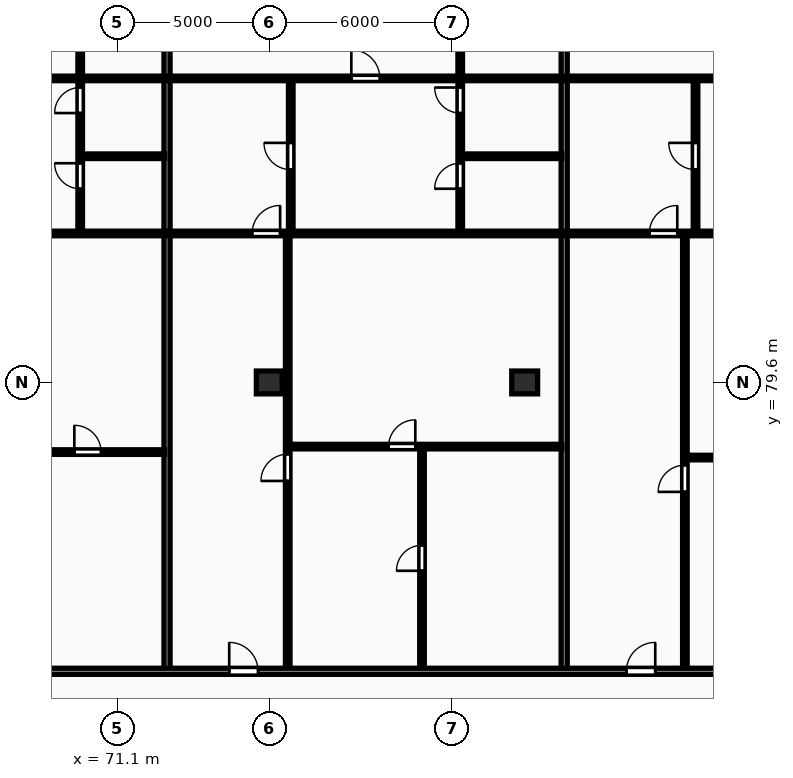
"""IFC4 building model, lengths in metres.
Left out: names, types, materials, properties, quantities, classifications, styles, units other than length and angle.
Written with IfcOpenShell. Run it as: python <this file> out.ifc"""

import sys

from ifc_helpers import new_model, si_unit, direction, frame, frame_2d, origin, origin_2d, place, context, subcontext, project, spatial, rectangle, extrude, element, fill, save


model = new_model("IFC4")
c1 = context("Model", 3, precision=1e-05, world=origin(), true_north=direction((0.0, 1.0)))
c2 = subcontext(c1, "Body", "Model", "MODEL_VIEW")
j1 = project(units=[si_unit("LENGTHUNIT", "METRE"), si_unit("PLANEANGLEUNIT", "RADIAN")], contexts=[c1])
p1 = place(None, origin())
s1 = spatial("IfcSite", under=j1, at=p1, CompositionType="ELEMENT")
p2 = place(p1, origin())
s2 = spatial("IfcBuilding", under=s1, at=p2, CompositionType="ELEMENT")
p3 = place(p2, frame((0.0, 0.0, 207.6)))
s3 = spatial("IfcBuildingStorey", under=s2, at=p3, CompositionType="ELEMENT", Elevation=207.6)
for number, where, z_axis, x_axis in (
    (1, (76.1, 79.6, 0.0), (0.0, 0.0, 1.0), (1.0, 0.0, 0.0)),
    (2, (84.5, 79.6, 0.0), (0.0, 0.0, 1.0), (1.0, 0.0, 0.0)),
):
    element("IfcColumn", number, at=place(p3, frame(where, z_axis=z_axis, x_axis=x_axis)), inside=s3, PredefinedType="COLUMN", context=c2, shape_type="SweptSolid", body=[
        extrude(rectangle(XDim=0.85, YDim=0.75, at=origin_2d()), origin(), (0.0, 0.0, 1.0), 3.25),
    ])
p4 = place(p3, frame((72.736, 70.18, 0.0), z_axis=(0.0, 0.0, 1.0), x_axis=(0.0, 1.0, 0.0)))
e3 = element("IfcWall", 3, at=p4, inside=s3, PredefinedType="PARTITIONING", context=c2, shape_type="SweptSolid", body=[
    extrude(rectangle(XDim=24.32, YDim=0.2, at=frame_2d((12.16, 0.0))), origin(), (0.0, 0.0, 1.0), 2.97),
])
p5 = place(p3, frame((63.83, 77.31, 0.0), z_axis=(0.0, 0.0, 1.0), x_axis=(1.0, 0.0, 0.0)))
e4 = element("IfcWall", 4, at=p5, inside=s3, PredefinedType="PARTITIONING", context=c2, shape_type="SweptSolid", body=[
    extrude(rectangle(XDim=8.826, YDim=0.15, at=frame_2d((4.413, 0.0))), origin(), (0.0, 0.0, 1.0), 2.97),
])
p6 = place(p5, frame((5.857, 0.0, 0.0)))
e5 = element("IfcOpeningElement", 5, at=p6, cuts=e4, PredefinedType="OPENING", context=c2, shape_type="SweptSolid", body=[
    extrude(rectangle(XDim=0.88, YDim=2.06, at=frame_2d((0.44, 1.03))), frame((0.0, 0.085, 0.0), z_axis=(0.0, -1.0, 0.0), x_axis=(1.0, 0.0, 0.0)), (0.0, 0.0, 1.0), 0.17),
])
p7 = place(p3, frame((69.94, 87.04, 0.0), z_axis=(0.0, 0.0, 1.0), x_axis=(1.0, 0.0, 0.0)))
e6 = element("IfcWall", 6, at=p7, inside=s3, PredefinedType="PARTITIONING", context=c2, shape_type="SweptSolid", body=[
    extrude(rectangle(XDim=2.716, YDim=0.15, at=frame_2d((1.358, 0.0))), origin(), (0.0, 0.0, 1.0), 2.97),
])
p8 = place(p3, frame((69.88, 84.54, 0.0), z_axis=(0.0, 0.0, 1.0), x_axis=(0.0, 1.0, 0.0)))
e7 = element("IfcWall", 7, at=p8, inside=s3, PredefinedType="PARTITIONING", context=c2, shape_type="SweptSolid", body=[
    extrude(rectangle(XDim=9.96, YDim=0.15, at=frame_2d((4.98, 0.0))), origin(), (0.0, 0.0, 1.0), 2.97),
])
p9 = place(p8, frame((1.43, 0.0, 0.0)))
e8 = element("IfcOpeningElement", 8, at=p9, cuts=e7, PredefinedType="OPENING", context=c2, shape_type="SweptSolid", body=[
    extrude(rectangle(XDim=0.84, YDim=2.04, at=frame_2d((0.42, 1.02))), frame((0.0, 0.085, 0.0), z_axis=(0.0, -1.0, 0.0), x_axis=(1.0, 0.0, 0.0)), (0.0, 0.0, 1.0), 0.17),
])
p10 = place(p8, frame((3.92, 0.0, 0.0)))
e9 = element("IfcOpeningElement", 9, at=p10, cuts=e7, PredefinedType="OPENING", context=c2, shape_type="SweptSolid", body=[
    extrude(rectangle(XDim=0.84, YDim=2.04, at=frame_2d((0.42, 1.02))), frame((0.0, 0.085, 0.0), z_axis=(0.0, -1.0, 0.0), x_axis=(1.0, 0.0, 0.0)), (0.0, 0.0, 1.0), 0.17),
])
p11 = place(p8, frame((8.297, 0.0, 0.0)))
e10 = element("IfcOpeningElement", 10, at=p11, cuts=e7, PredefinedType="OPENING", context=c2, shape_type="SweptSolid", body=[
    extrude(rectangle(XDim=0.88, YDim=2.06, at=frame_2d((0.44, 1.03))), frame((0.0, 0.085, 0.0), z_axis=(0.0, -1.0, 0.0), x_axis=(1.0, 0.0, 0.0)), (0.0, 0.0, 1.0), 0.17),
])
p12 = place(p3, frame((59.88, 84.5, 0.0), z_axis=(0.0, 0.0, 1.0), x_axis=(1.0, 0.0, 0.0)))
e11 = element("IfcWall", 11, at=p12, inside=s3, PredefinedType="PARTITIONING", context=c2, shape_type="SweptSolid", body=[
    extrude(rectangle(XDim=12.776, YDim=0.15, at=frame_2d((6.388, 0.0))), origin(), (0.0, 0.0, 1.0), 2.97),
])
p13 = place(p12, frame((2.72, 0.0, 0.0)))
e12 = element("IfcOpeningElement", 12, at=p13, cuts=e11, PredefinedType="OPENING", context=c2, shape_type="SweptSolid", body=[
    extrude(rectangle(XDim=0.92, YDim=2.08, at=frame_2d((0.46, 1.04))), frame((0.0, 0.085, 0.0), z_axis=(0.0, -1.0, 0.0), x_axis=(1.0, 0.0, 0.0)), (0.0, 0.0, 1.0), 0.17),
])
p14 = place(p3, frame((59.88, 89.6, 0.0), z_axis=(0.0, 0.0, 1.0), x_axis=(1.0, 0.0, 0.0)))
e13 = element("IfcWall", 13, at=p14, inside=s3, PredefinedType="PARTITIONING", context=c2, shape_type="SweptSolid", body=[
    extrude(rectangle(XDim=12.776, YDim=0.15, at=frame_2d((6.388, 0.0))), origin(), (0.0, 0.0, 1.0), 2.97),
])
p15 = place(p14, frame((5.557, 0.0, 0.0)))
e14 = element("IfcOpeningElement", 14, at=p15, cuts=e13, PredefinedType="OPENING", context=c2, shape_type="SweptSolid", body=[
    extrude(rectangle(XDim=0.94, YDim=2.1, at=frame_2d((0.47, 1.05))), frame((0.0, 0.085, 0.0), z_axis=(0.0, -1.0, 0.0), x_axis=(1.0, 0.0, 0.0)), (0.0, 0.0, 1.0), 0.17),
])
p16 = place(p3, frame((85.8, 70.18, 0.0), z_axis=(0.0, 0.0, 1.0), x_axis=(0.0, 1.0, 0.0)))
e15 = element("IfcWall", 15, at=p16, inside=s3, PredefinedType="PARTITIONING", context=c2, shape_type="SweptSolid", body=[
    extrude(rectangle(XDim=24.32, YDim=0.2, at=frame_2d((12.16, 0.0))), origin(), (0.0, 0.0, 1.0), 2.97),
])
p17 = place(p3, frame((81.123, 70.16, 0.0), z_axis=(0.0, 0.0, 1.0), x_axis=(0.0, 1.0, 0.0)))
e16 = element("IfcWall", 16, at=p17, inside=s3, PredefinedType="PARTITIONING", context=c2, shape_type="SweptSolid", body=[
    extrude(rectangle(XDim=7.33, YDim=0.15, at=frame_2d((3.665, 0.0))), origin(), (0.0, 0.0, 1.0), 2.97),
])
p18 = place(p17, frame((3.245, 0.0, 0.0)))
e17 = element("IfcOpeningElement", 17, at=p18, cuts=e16, PredefinedType="OPENING", context=c2, shape_type="SweptSolid", body=[
    extrude(rectangle(XDim=0.84, YDim=2.04, at=frame_2d((0.42, 1.02))), frame((0.0, 0.085, 0.0), z_axis=(0.0, -1.0, 0.0), x_axis=(1.0, 0.0, 0.0)), (0.0, 0.0, 1.0), 0.17),
])
p19 = place(p3, frame((76.766, 77.49, 0.0), z_axis=(0.0, 0.0, 1.0), x_axis=(1.0, 0.0, 0.0)))
e18 = element("IfcWall", 18, at=p19, inside=s3, PredefinedType="PARTITIONING", context=c2, shape_type="SweptSolid", body=[
    extrude(rectangle(XDim=8.954, YDim=0.15, at=frame_2d((4.477, 0.0))), origin(), (0.0, 0.0, 1.0), 2.97),
])
p20 = place(p19, frame((3.257, 0.0, 0.0)))
e19 = element("IfcOpeningElement", 19, at=p20, cuts=e18, PredefinedType="OPENING", context=c2, shape_type="SweptSolid", body=[
    extrude(rectangle(XDim=0.88, YDim=2.06, at=frame_2d((0.44, 1.03))), frame((0.0, 0.085, 0.0), z_axis=(0.0, -1.0, 0.0), x_axis=(1.0, 0.0, 0.0)), (0.0, 0.0, 1.0), 0.17),
])
p21 = place(p3, frame((76.706, 70.16, 0.0), z_axis=(0.0, 0.0, 1.0), x_axis=(0.0, 1.0, 0.0)))
e20 = element("IfcWall", 20, at=p21, inside=s3, PredefinedType="PARTITIONING", context=c2, shape_type="SweptSolid", body=[
    extrude(rectangle(XDim=14.3, YDim=0.15, at=frame_2d((7.15, 0.0))), origin(), (0.0, 0.0, 1.0), 2.97),
])
p22 = place(p21, frame((6.2, 0.0, 0.0)))
e21 = element("IfcOpeningElement", 21, at=p22, cuts=e20, PredefinedType="OPENING", context=c2, shape_type="SweptSolid", body=[
    extrude(rectangle(XDim=0.88, YDim=2.06, at=frame_2d((0.44, 1.03))), frame((0.0, 0.085, 0.0), z_axis=(0.0, -1.0, 0.0), x_axis=(1.0, 0.0, 0.0)), (0.0, 0.0, 1.0), 0.17),
])
p23 = place(p3, frame((76.806, 84.54, 0.0), z_axis=(0.0, 0.0, 1.0), x_axis=(0.0, 1.0, 0.0)))
e22 = element("IfcWall", 22, at=p23, inside=s3, PredefinedType="PARTITIONING", context=c2, shape_type="SweptSolid", body=[
    extrude(rectangle(XDim=5.0, YDim=0.15, at=frame_2d((2.5, 0.0))), origin(), (0.0, 0.0, 1.0), 2.97),
])
p24 = place(p23, frame((2.06, 0.0, 0.0)))
e23 = element("IfcOpeningElement", 23, at=p24, cuts=e22, PredefinedType="OPENING", context=c2, shape_type="SweptSolid", body=[
    extrude(rectangle(XDim=0.88, YDim=2.06, at=frame_2d((0.44, 1.03))), frame((0.0, 0.085, 0.0), z_axis=(0.0, -1.0, 0.0), x_axis=(1.0, 0.0, 0.0)), (0.0, 0.0, 1.0), 0.17),
])
p25 = place(p3, frame((82.44, 87.04, 0.0), z_axis=(0.0, 0.0, 1.0), x_axis=(1.0, 0.0, 0.0)))
e24 = element("IfcWall", 24, at=p25, inside=s3, PredefinedType="PARTITIONING", context=c2, shape_type="SweptSolid", body=[
    extrude(rectangle(XDim=3.28, YDim=0.15, at=frame_2d((1.64, 0.0))), origin(), (0.0, 0.0, 1.0), 2.97),
])
p26 = place(p3, frame((82.38, 84.54, 0.0), z_axis=(0.0, 0.0, 1.0), x_axis=(0.0, 1.0, 0.0)))
e25 = element("IfcWall", 25, at=p26, inside=s3, PredefinedType="PARTITIONING", context=c2, shape_type="SweptSolid", body=[
    extrude(rectangle(XDim=9.96, YDim=0.15, at=frame_2d((4.98, 0.0))), origin(), (0.0, 0.0, 1.0), 2.97),
])
p27 = place(p26, frame((1.43, 0.0, 0.0)))
e26 = element("IfcOpeningElement", 26, at=p27, cuts=e25, PredefinedType="OPENING", context=c2, shape_type="SweptSolid", body=[
    extrude(rectangle(XDim=0.84, YDim=2.04, at=frame_2d((0.42, 1.02))), frame((0.0, 0.085, 0.0), z_axis=(0.0, -1.0, 0.0), x_axis=(1.0, 0.0, 0.0)), (0.0, 0.0, 1.0), 0.17),
])
p28 = place(p26, frame((3.92, 0.0, 0.0)))
e27 = element("IfcOpeningElement", 27, at=p28, cuts=e25, PredefinedType="OPENING", context=c2, shape_type="SweptSolid", body=[
    extrude(rectangle(XDim=0.84, YDim=2.04, at=frame_2d((0.42, 1.02))), frame((0.0, 0.085, 0.0), z_axis=(0.0, -1.0, 0.0), x_axis=(1.0, 0.0, 0.0)), (0.0, 0.0, 1.0), 0.17),
])
p29 = place(p26, frame((8.297, 0.0, 0.0)))
e28 = element("IfcOpeningElement", 28, at=p29, cuts=e25, PredefinedType="OPENING", context=c2, shape_type="SweptSolid", body=[
    extrude(rectangle(XDim=0.88, YDim=2.06, at=frame_2d((0.44, 1.03))), frame((0.0, 0.085, 0.0), z_axis=(0.0, -1.0, 0.0), x_axis=(1.0, 0.0, 0.0)), (0.0, 0.0, 1.0), 0.17),
])
p30 = place(p3, frame((72.816, 84.5, 0.0), z_axis=(0.0, 0.0, 1.0), x_axis=(1.0, 0.0, 0.0)))
e29 = element("IfcWall", 29, at=p30, inside=s3, PredefinedType="PARTITIONING", context=c2, shape_type="SweptSolid", body=[
    extrude(rectangle(XDim=12.904, YDim=0.15, at=frame_2d((6.452, 0.0))), origin(), (0.0, 0.0, 1.0), 2.97),
])
p31 = place(p30, frame((2.72, 0.0, 0.0)))
e30 = element("IfcOpeningElement", 30, at=p31, cuts=e29, PredefinedType="OPENING", context=c2, shape_type="SweptSolid", body=[
    extrude(rectangle(XDim=0.92, YDim=2.08, at=frame_2d((0.46, 1.04))), frame((0.0, 0.085, 0.0), z_axis=(0.0, -1.0, 0.0), x_axis=(1.0, 0.0, 0.0)), (0.0, 0.0, 1.0), 0.17),
])
p32 = place(p3, frame((72.816, 89.6, 0.0), z_axis=(0.0, 0.0, 1.0), x_axis=(1.0, 0.0, 0.0)))
e31 = element("IfcWall", 31, at=p32, inside=s3, PredefinedType="PARTITIONING", context=c2, shape_type="SweptSolid", body=[
    extrude(rectangle(XDim=12.904, YDim=0.15, at=frame_2d((6.452, 0.0))), origin(), (0.0, 0.0, 1.0), 2.97),
])
p33 = place(p32, frame((5.982, 0.0, 0.0)))
e32 = element("IfcOpeningElement", 32, at=p33, cuts=e31, PredefinedType="OPENING", context=c2, shape_type="SweptSolid", body=[
    extrude(rectangle(XDim=0.94, YDim=2.1, at=frame_2d((0.47, 1.05))), frame((0.0, 0.085, 0.0), z_axis=(0.0, -1.0, 0.0), x_axis=(1.0, 0.0, 0.0)), (0.0, 0.0, 1.0), 0.17),
])
p34 = place(p3, frame((89.83, 77.13, 0.0), z_axis=(0.0, 0.0, 1.0), x_axis=(1.0, 0.0, 0.0)))
e33 = element("IfcWall", 33, at=p34, inside=s3, PredefinedType="PARTITIONING", context=c2, shape_type="SweptSolid", body=[
    extrude(rectangle(XDim=8.826, YDim=0.15, at=frame_2d((4.413, 0.0))), origin(), (0.0, 0.0, 1.0), 2.97),
])
p35 = place(p34, frame((5.567, 0.0, 0.0)))
e34 = element("IfcOpeningElement", 34, at=p35, cuts=e33, PredefinedType="OPENING", context=c2, shape_type="SweptSolid", body=[
    extrude(rectangle(XDim=0.88, YDim=2.06, at=frame_2d((0.44, 1.03))), frame((0.0, 0.085, 0.0), z_axis=(0.0, -1.0, 0.0), x_axis=(1.0, 0.0, 0.0)), (0.0, 0.0, 1.0), 0.17),
])
p36 = place(p3, frame((89.77, 70.16, 0.0), z_axis=(0.0, 0.0, 1.0), x_axis=(0.0, 1.0, 0.0)))
e35 = element("IfcWall", 35, at=p36, inside=s3, PredefinedType="PARTITIONING", context=c2, shape_type="SweptSolid", body=[
    extrude(rectangle(XDim=14.3, YDim=0.15, at=frame_2d((7.15, 0.0))), origin(), (0.0, 0.0, 1.0), 2.97),
])
p37 = place(p36, frame((5.84, 0.0, 0.0)))
e36 = element("IfcOpeningElement", 36, at=p37, cuts=e35, PredefinedType="OPENING", context=c2, shape_type="SweptSolid", body=[
    extrude(rectangle(XDim=0.88, YDim=2.06, at=frame_2d((0.44, 1.03))), frame((0.0, 0.085, 0.0), z_axis=(0.0, -1.0, 0.0), x_axis=(1.0, 0.0, 0.0)), (0.0, 0.0, 1.0), 0.17),
])
p38 = place(p3, frame((90.12, 84.54, 0.0), z_axis=(0.0, 0.0, 1.0), x_axis=(0.0, 1.0, 0.0)))
e37 = element("IfcWall", 37, at=p38, inside=s3, PredefinedType="PARTITIONING", context=c2, shape_type="SweptSolid", body=[
    extrude(rectangle(XDim=5.0, YDim=0.15, at=frame_2d((2.5, 0.0))), origin(), (0.0, 0.0, 1.0), 2.97),
])
p39 = place(p38, frame((2.06, 0.0, 0.0)))
e38 = element("IfcOpeningElement", 38, at=p39, cuts=e37, PredefinedType="OPENING", context=c2, shape_type="SweptSolid", body=[
    extrude(rectangle(XDim=0.88, YDim=2.06, at=frame_2d((0.44, 1.03))), frame((0.0, 0.085, 0.0), z_axis=(0.0, -1.0, 0.0), x_axis=(1.0, 0.0, 0.0)), (0.0, 0.0, 1.0), 0.17),
])
p40 = place(p3, frame((85.88, 84.5, 0.0), z_axis=(0.0, 0.0, 1.0), x_axis=(1.0, 0.0, 0.0)))
e39 = element("IfcWall", 39, at=p40, inside=s3, PredefinedType="PARTITIONING", context=c2, shape_type="SweptSolid", body=[
    extrude(rectangle(XDim=12.776, YDim=0.15, at=frame_2d((6.388, 0.0))), origin(), (0.0, 0.0, 1.0), 2.97),
])
p41 = place(p40, frame((2.72, 0.0, 0.0)))
e40 = element("IfcOpeningElement", 40, at=p41, cuts=e39, PredefinedType="OPENING", context=c2, shape_type="SweptSolid", body=[
    extrude(rectangle(XDim=0.92, YDim=2.08, at=frame_2d((0.46, 1.04))), frame((0.0, 0.085, 0.0), z_axis=(0.0, -1.0, 0.0), x_axis=(1.0, 0.0, 0.0)), (0.0, 0.0, 1.0), 0.17),
])
p42 = place(p3, frame((85.88, 89.6, 0.0), z_axis=(0.0, 0.0, 1.0), x_axis=(1.0, 0.0, 0.0)))
e41 = element("IfcWall", 41, at=p42, inside=s3, PredefinedType="PARTITIONING", context=c2, shape_type="SweptSolid", body=[
    extrude(rectangle(XDim=12.776, YDim=0.15, at=frame_2d((6.388, 0.0))), origin(), (0.0, 0.0, 1.0), 2.97),
])
p43 = place(p42, frame((5.206, 0.0, 0.0)))
e42 = element("IfcOpeningElement", 42, at=p43, cuts=e41, PredefinedType="OPENING", context=c2, shape_type="SweptSolid", body=[
    extrude(rectangle(XDim=0.94, YDim=2.1, at=frame_2d((0.47, 1.05))), frame((0.0, 0.085, 0.0), z_axis=(0.0, -1.0, 0.0), x_axis=(1.0, 0.0, 0.0)), (0.0, 0.0, 1.0), 0.17),
])
p44 = place(p3, frame((59.8, 70.1, 0.0), z_axis=(0.0, 0.0, 1.0), x_axis=(1.0, 0.0, 0.0)))
e43 = element("IfcWall", 43, at=p44, inside=s3, PredefinedType="PARTITIONING", context=c2, shape_type="SweptSolid", body=[
    extrude(rectangle(XDim=68.6, YDim=0.2, at=frame_2d((34.3, 0.0))), origin(), (0.0, 0.0, 1.0), 2.97),
])
p45 = place(p44, frame((2.045, 0.0, 0.0)))
e44 = element("IfcOpeningElement", 44, at=p45, cuts=e43, PredefinedType="OPENING", context=c2, shape_type="SweptSolid", body=[
    extrude(rectangle(XDim=0.95, YDim=2.15, at=frame_2d((0.475, 1.075))), frame((0.0, 0.11, 0.0), z_axis=(0.0, -1.0, 0.0), x_axis=(1.0, 0.0, 0.0)), (0.0, 0.0, 1.0), 0.22),
])
p46 = place(p44, frame((14.981, 0.0, 0.0)))
e45 = element("IfcOpeningElement", 45, at=p46, cuts=e43, PredefinedType="OPENING", context=c2, shape_type="SweptSolid", body=[
    extrude(rectangle(XDim=0.95, YDim=2.15, at=frame_2d((0.475, 1.075))), frame((0.0, 0.11, 0.0), z_axis=(0.0, -1.0, 0.0), x_axis=(1.0, 0.0, 0.0)), (0.0, 0.0, 1.0), 0.22),
])
p47 = place(p44, frame((28.045, 0.0, 0.0)))
e46 = element("IfcOpeningElement", 46, at=p47, cuts=e43, PredefinedType="OPENING", context=c2, shape_type="SweptSolid", body=[
    extrude(rectangle(XDim=0.95, YDim=2.15, at=frame_2d((0.475, 1.075))), frame((0.0, 0.11, 0.0), z_axis=(0.0, -1.0, 0.0), x_axis=(1.0, 0.0, 0.0)), (0.0, 0.0, 1.0), 0.22),
])
p48 = place(p44, frame((40.981, 0.0, 0.0)))
e47 = element("IfcOpeningElement", 47, at=p48, cuts=e43, PredefinedType="OPENING", context=c2, shape_type="SweptSolid", body=[
    extrude(rectangle(XDim=0.95, YDim=2.15, at=frame_2d((0.475, 1.075))), frame((0.0, 0.11, 0.0), z_axis=(0.0, -1.0, 0.0), x_axis=(1.0, 0.0, 0.0)), (0.0, 0.0, 1.0), 0.22),
])
p49 = place(p44, frame((54.045, 0.0, 0.0)))
e48 = element("IfcOpeningElement", 48, at=p49, cuts=e43, PredefinedType="OPENING", context=c2, shape_type="SweptSolid", body=[
    extrude(rectangle(XDim=0.95, YDim=2.15, at=frame_2d((0.475, 1.075))), frame((0.0, 0.11, 0.0), z_axis=(0.0, -1.0, 0.0), x_axis=(1.0, 0.0, 0.0)), (0.0, 0.0, 1.0), 0.22),
])
p50 = place(p6, origin())
e49 = element("IfcDoor", 49, at=p50, inside=s3, OperationType="SINGLE_SWING_LEFT", PredefinedType="DOOR", context=c2, shape_type="SweptSolid", body=[
    extrude(rectangle(XDim=0.88, YDim=2.06, at=frame_2d((0.44, 1.03))), frame((0.0, 0.025, 0.0), z_axis=(0.0, -1.0, 0.0), x_axis=(1.0, 0.0, 0.0)), (0.0, 0.0, 1.0), 0.05),
])
fill(e5, e49)
p51 = place(p9, origin())
e50 = element("IfcDoor", 50, at=p51, inside=s3, OperationType="SINGLE_SWING_RIGHT", PredefinedType="DOOR", context=c2, shape_type="SweptSolid", body=[
    extrude(rectangle(XDim=0.84, YDim=2.04, at=frame_2d((0.42, 1.02))), frame((0.0, 0.025, 0.0), z_axis=(0.0, -1.0, 0.0), x_axis=(1.0, 0.0, 0.0)), (0.0, 0.0, 1.0), 0.05),
])
fill(e8, e50)
p52 = place(p10, origin())
e51 = element("IfcDoor", 51, at=p52, inside=s3, OperationType="SINGLE_SWING_LEFT", PredefinedType="DOOR", context=c2, shape_type="SweptSolid", body=[
    extrude(rectangle(XDim=0.84, YDim=2.04, at=frame_2d((0.42, 1.02))), frame((0.0, 0.025, 0.0), z_axis=(0.0, -1.0, 0.0), x_axis=(1.0, 0.0, 0.0)), (0.0, 0.0, 1.0), 0.05),
])
fill(e9, e51)
p53 = place(p18, origin())
e52 = element("IfcDoor", 52, at=p53, inside=s3, OperationType="SINGLE_SWING_LEFT", PredefinedType="DOOR", context=c2, shape_type="SweptSolid", body=[
    extrude(rectangle(XDim=0.84, YDim=2.04, at=frame_2d((0.42, 1.02))), frame((0.0, 0.025, 0.0), z_axis=(0.0, -1.0, 0.0), x_axis=(1.0, 0.0, 0.0)), (0.0, 0.0, 1.0), 0.05),
])
fill(e17, e52)
p54 = place(p20, origin())
e53 = element("IfcDoor", 53, at=p54, inside=s3, OperationType="SINGLE_SWING_RIGHT", PredefinedType="DOOR", context=c2, shape_type="SweptSolid", body=[
    extrude(rectangle(XDim=0.88, YDim=2.06, at=frame_2d((0.44, 1.03))), frame((0.0, 0.025, 0.0), z_axis=(0.0, -1.0, 0.0), x_axis=(1.0, 0.0, 0.0)), (0.0, 0.0, 1.0), 0.05),
])
fill(e19, e53)
p55 = place(p22, origin())
e54 = element("IfcDoor", 54, at=p55, inside=s3, OperationType="SINGLE_SWING_LEFT", PredefinedType="DOOR", context=c2, shape_type="SweptSolid", body=[
    extrude(rectangle(XDim=0.88, YDim=2.06, at=frame_2d((0.44, 1.03))), frame((0.0, 0.025, 0.0), z_axis=(0.0, -1.0, 0.0), x_axis=(1.0, 0.0, 0.0)), (0.0, 0.0, 1.0), 0.05),
])
fill(e21, e54)
p56 = place(p24, origin())
e55 = element("IfcDoor", 55, at=p56, inside=s3, OperationType="SINGLE_SWING_RIGHT", PredefinedType="DOOR", context=c2, shape_type="SweptSolid", body=[
    extrude(rectangle(XDim=0.88, YDim=2.06, at=frame_2d((0.44, 1.03))), frame((0.0, 0.025, 0.0), z_axis=(0.0, -1.0, 0.0), x_axis=(1.0, 0.0, 0.0)), (0.0, 0.0, 1.0), 0.05),
])
fill(e23, e55)
p57 = place(p27, origin())
e56 = element("IfcDoor", 56, at=p57, inside=s3, OperationType="SINGLE_SWING_LEFT", PredefinedType="DOOR", context=c2, shape_type="SweptSolid", body=[
    extrude(rectangle(XDim=0.84, YDim=2.04, at=frame_2d((0.42, 1.02))), frame((0.0, 0.025, 0.0), z_axis=(0.0, -1.0, 0.0), x_axis=(1.0, 0.0, 0.0)), (0.0, 0.0, 1.0), 0.05),
])
fill(e26, e56)
p58 = place(p28, origin())
e57 = element("IfcDoor", 57, at=p58, inside=s3, OperationType="SINGLE_SWING_RIGHT", PredefinedType="DOOR", context=c2, shape_type="SweptSolid", body=[
    extrude(rectangle(XDim=0.84, YDim=2.04, at=frame_2d((0.42, 1.02))), frame((0.0, 0.025, 0.0), z_axis=(0.0, -1.0, 0.0), x_axis=(1.0, 0.0, 0.0)), (0.0, 0.0, 1.0), 0.05),
])
fill(e27, e57)
p59 = place(p31, origin())
e58 = element("IfcDoor", 58, at=p59, inside=s3, OperationType="SINGLE_SWING_RIGHT", PredefinedType="DOOR", context=c2, shape_type="SweptSolid", body=[
    extrude(rectangle(XDim=0.92, YDim=2.08, at=frame_2d((0.46, 1.04))), frame((0.0, 0.025, 0.0), z_axis=(0.0, -1.0, 0.0), x_axis=(1.0, 0.0, 0.0)), (0.0, 0.0, 1.0), 0.05),
])
fill(e30, e58)
p60 = place(p33, origin())
e59 = element("IfcDoor", 59, at=p60, inside=s3, OperationType="SINGLE_SWING_LEFT", PredefinedType="DOOR", context=c2, shape_type="SweptSolid", body=[
    extrude(rectangle(XDim=0.94, YDim=2.1, at=frame_2d((0.47, 1.05))), frame((0.0, 0.025, 0.0), z_axis=(0.0, -1.0, 0.0), x_axis=(1.0, 0.0, 0.0)), (0.0, 0.0, 1.0), 0.05),
])
fill(e32, e59)
p61 = place(p37, origin())
e60 = element("IfcDoor", 60, at=p61, inside=s3, OperationType="SINGLE_SWING_LEFT", PredefinedType="DOOR", context=c2, shape_type="SweptSolid", body=[
    extrude(rectangle(XDim=0.88, YDim=2.06, at=frame_2d((0.44, 1.03))), frame((0.0, 0.025, 0.0), z_axis=(0.0, -1.0, 0.0), x_axis=(1.0, 0.0, 0.0)), (0.0, 0.0, 1.0), 0.05),
])
fill(e36, e60)
p62 = place(p39, origin())
e61 = element("IfcDoor", 61, at=p62, inside=s3, OperationType="SINGLE_SWING_RIGHT", PredefinedType="DOOR", context=c2, shape_type="SweptSolid", body=[
    extrude(rectangle(XDim=0.88, YDim=2.06, at=frame_2d((0.44, 1.03))), frame((0.0, 0.025, 0.0), z_axis=(0.0, -1.0, 0.0), x_axis=(1.0, 0.0, 0.0)), (0.0, 0.0, 1.0), 0.05),
])
fill(e38, e61)
p63 = place(p41, origin())
e62 = element("IfcDoor", 62, at=p63, inside=s3, OperationType="SINGLE_SWING_RIGHT", PredefinedType="DOOR", context=c2, shape_type="SweptSolid", body=[
    extrude(rectangle(XDim=0.92, YDim=2.08, at=frame_2d((0.46, 1.04))), frame((0.0, 0.025, 0.0), z_axis=(0.0, -1.0, 0.0), x_axis=(1.0, 0.0, 0.0)), (0.0, 0.0, 1.0), 0.05),
])
fill(e40, e62)
p64 = place(p46, origin())
e63 = element("IfcDoor", 63, at=p64, inside=s3, OperationType="SINGLE_SWING_LEFT", PredefinedType="DOOR", context=c2, shape_type="SweptSolid", body=[
    extrude(rectangle(XDim=0.95, YDim=2.15, at=frame_2d((0.475, 1.075))), frame((0.0, 0.025, 0.0), z_axis=(0.0, -1.0, 0.0), x_axis=(1.0, 0.0, 0.0)), (0.0, 0.0, 1.0), 0.05),
])
fill(e45, e63)
p65 = place(p47, origin())
e64 = element("IfcDoor", 64, at=p65, inside=s3, OperationType="SINGLE_SWING_RIGHT", PredefinedType="DOOR", context=c2, shape_type="SweptSolid", body=[
    extrude(rectangle(XDim=0.95, YDim=2.15, at=frame_2d((0.475, 1.075))), frame((0.0, 0.025, 0.0), z_axis=(0.0, -1.0, 0.0), x_axis=(1.0, 0.0, 0.0)), (0.0, 0.0, 1.0), 0.05),
])
fill(e46, e64)
save(model, sys.argv[1])
